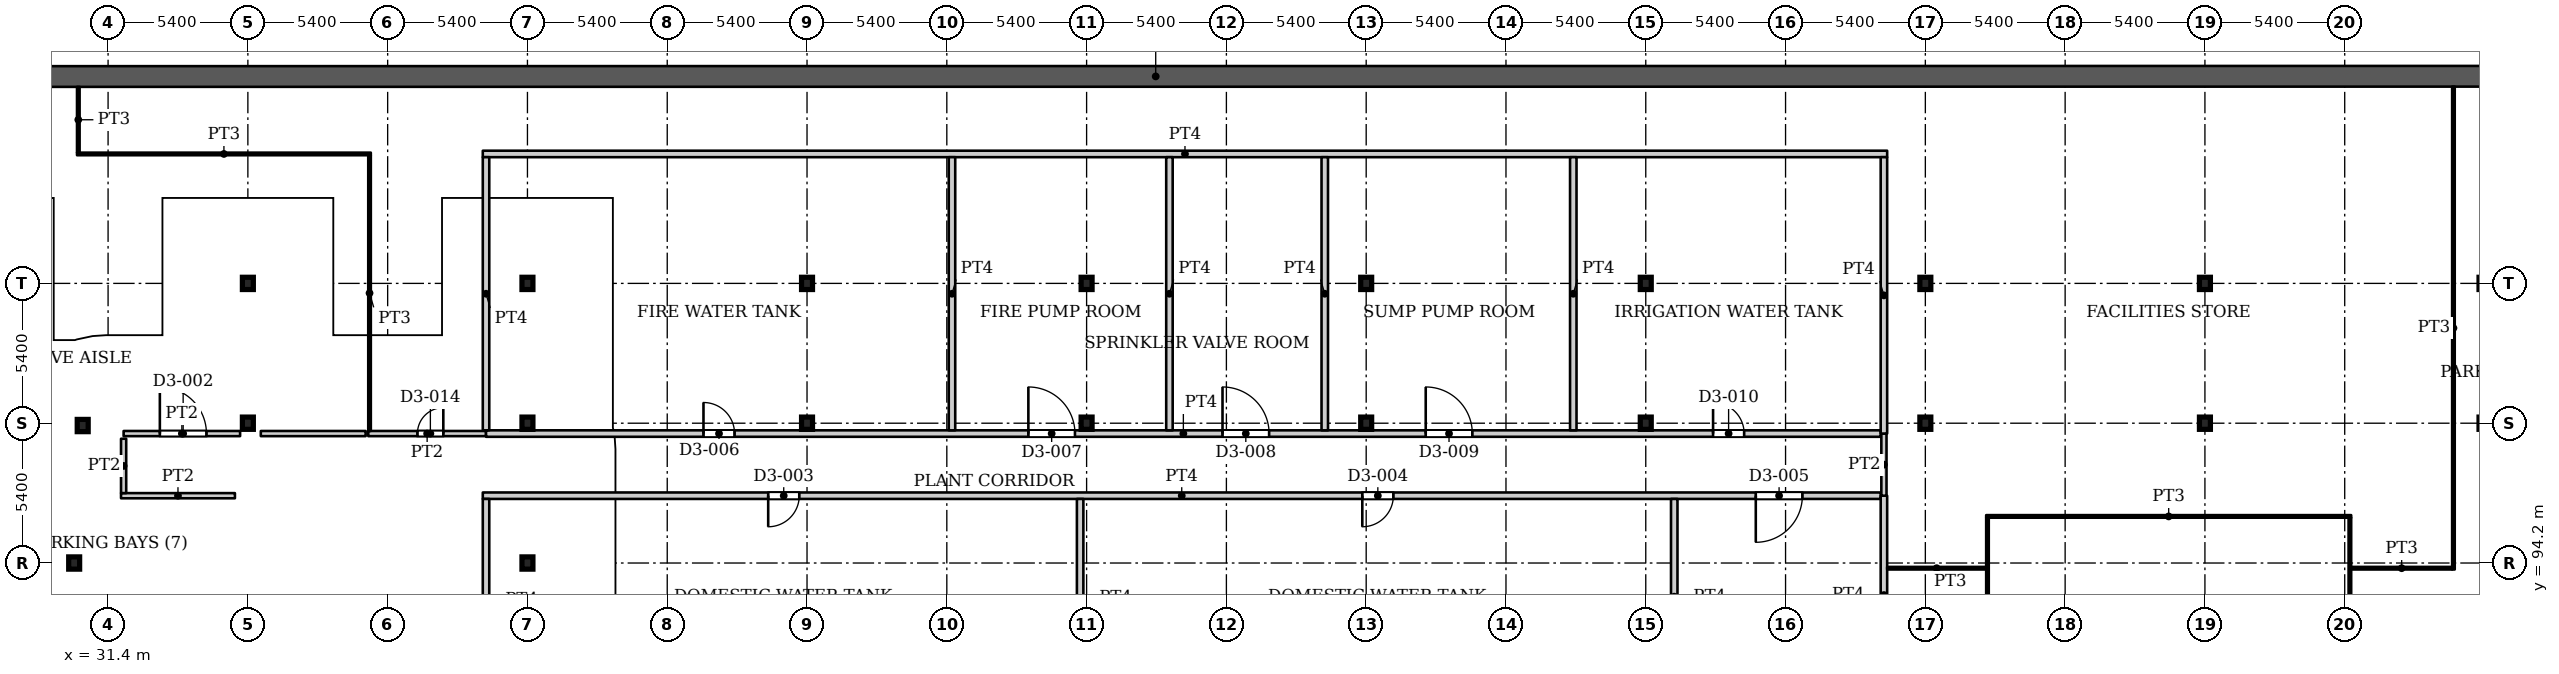
"""IFC4 building model, lengths in metres.
Left out: names, types, materials, properties, quantities, classifications, styles, units other than length and angle.
Written with IfcOpenShell. Run it as: python <this file> out.ifc"""

import sys

from ifc_helpers import new_model, si_unit, direction, frame, frame_2d, origin, origin_2d, place, context, subcontext, project, spatial, rectangle, i_section, extrude, source, transform, mapped, element, fill, save


model = new_model("IFC4")
c1 = context("Model", 3, precision=1e-05, world=origin(), true_north=direction((0.0, 1.0)))
c2 = subcontext(c1, "Body", "Model", "MODEL_VIEW")
j1 = project(units=[si_unit("LENGTHUNIT", "METRE"), si_unit("PLANEANGLEUNIT", "RADIAN")], contexts=[c1])
p1 = place(None, origin())
s1 = spatial("IfcSite", under=j1, at=p1, CompositionType="ELEMENT")
p2 = place(p1, origin())
s2 = spatial("IfcBuilding", under=s1, at=p2, CompositionType="ELEMENT")
p3 = place(p2, frame((0.0, 0.0, -15.0)))
s3 = spatial("IfcBuildingStorey", under=s2, at=p3, CompositionType="ELEMENT", Elevation=-15.0)
for number, where, z_axis, x_axis in (
    (1, (36.8, 99.6, 0.0), (0.0, 0.0, 1.0), (1.0, 0.0, 0.0)),
    (2, (47.6, 99.6, 0.0), (0.0, 0.0, 1.0), (1.0, 0.0, 0.0)),
    (3, (58.4, 99.6, 0.0), (0.0, 0.0, 1.0), (1.0, 0.0, 0.0)),
    (4, (69.2, 99.6, 0.0), (0.0, 0.0, 1.0), (1.0, 0.0, 0.0)),
    (5, (80.0, 99.6, 0.0), (0.0, 0.0, 1.0), (1.0, 0.0, 0.0)),
    (6, (90.8, 99.6, 0.0), (0.0, 0.0, 1.0), (1.0, 0.0, 0.0)),
    (7, (101.6, 99.6, 0.0), (0.0, 0.0, 1.0), (1.0, 0.0, 0.0)),
    (8, (112.4, 99.6, 0.0), (0.0, 0.0, 1.0), (1.0, 0.0, 0.0)),
    (9, (123.2, 99.6, 0.0), (0.0, 0.0, 1.0), (1.0, 0.0, 0.0)),
    (10, (36.8, 105.0, 0.0), (0.0, 0.0, 1.0), (1.0, 0.0, 0.0)),
    (11, (47.6, 105.0, 0.0), (0.0, 0.0, 1.0), (1.0, 0.0, 0.0)),
    (12, (58.4, 105.0, 0.0), (0.0, 0.0, 1.0), (1.0, 0.0, 0.0)),
    (13, (69.2, 105.0, 0.0), (0.0, 0.0, 1.0), (1.0, 0.0, 0.0)),
    (14, (80.0, 105.0, 0.0), (0.0, 0.0, 1.0), (1.0, 0.0, 0.0)),
    (15, (90.8, 105.0, 0.0), (0.0, 0.0, 1.0), (1.0, 0.0, 0.0)),
    (16, (101.6, 105.0, 0.0), (0.0, 0.0, 1.0), (1.0, 0.0, 0.0)),
    (17, (112.4, 105.0, 0.0), (0.0, 0.0, 1.0), (1.0, 0.0, 0.0)),
    (18, (123.2, 105.0, 0.0), (0.0, 0.0, 1.0), (1.0, 0.0, 0.0)),
    (19, (30.09, 94.2, 0.0), (0.0, 0.0, 1.0), (1.0, 0.0, 0.0)),
    (20, (47.6, 94.2, 0.0), (0.0, 0.0, 1.0), (1.0, 0.0, 0.0)),
    (21, (30.42, 99.51, 0.0), (0.0, 0.0, 1.0), (1.0, 0.0, 0.0)),
):
    element("IfcColumn", number, at=place(p3, frame(where, z_axis=z_axis, x_axis=x_axis)), inside=s3, PredefinedType="COLUMN", context=c2, shape_type="SweptSolid", body=[
        extrude(i_section(OverallWidth=0.424, OverallDepth=0.474, WebThickness=0.048, FlangeThickness=0.077, FilletRadius=0.014, at=origin_2d()), origin(), (0.0, 0.0, 1.0), 5.0),
    ])
p4 = place(p3, frame((17.739, 112.989, 0.0), z_axis=(0.0, 0.0, 1.0), x_axis=(0.999999994851, 0.000101480029, 0.0)))
e22 = element("IfcWall", 22, at=p4, inside=s3, PredefinedType="SOLIDWALL", context=c2, shape_type="SweptSolid", body=[
    extrude(rectangle(XDim=108.261, YDim=0.8, at=frame_2d((54.13, 0.0))), origin(), (0.0, 0.0, 1.0), 5.0),
])
p5 = place(p3, frame((30.2, 110.0, 0.0), z_axis=(0.0, 0.0, 1.0), x_axis=(1.0, 0.0, 0.0)))
e23 = element("IfcWall", 23, at=p5, inside=s3, PredefinedType="PARTITIONING", context=c2, shape_type="SweptSolid", body=[
    extrude(rectangle(XDim=11.35, YDim=0.1, at=frame_2d((5.675, 0.0))), origin(), (0.0, 0.0, 1.0), 4.68),
])
p6 = place(p3, frame((30.25, 110.05, 0.0), z_axis=(0.0, 0.0, 1.0), x_axis=(0.0, 1.0, 0.0)))
e24 = element("IfcWall", 24, at=p6, inside=s3, PredefinedType="PARTITIONING", context=c2, shape_type="SweptSolid", body=[
    extrude(rectangle(XDim=2.541, YDim=0.1, at=frame_2d((1.271, 0.0))), origin(), (0.0, 0.0, 1.0), 4.68),
])
p7 = place(p3, frame((31.9, 96.8, 0.0), z_axis=(0.0, 0.0, 1.0), x_axis=(1.0, 0.0, 0.0)))
e25 = element("IfcWall", 25, at=p7, inside=s3, PredefinedType="PARTITIONING", context=c2, shape_type="SweptSolid", body=[
    extrude(rectangle(XDim=4.4, YDim=0.2, at=frame_2d((2.2, 0.0))), origin(), (0.0, 0.0, 1.0), 4.68),
])
p8 = place(p3, frame((32.0, 96.9, 0.0), z_axis=(0.0, 0.0, 1.0), x_axis=(0.0, 1.0, 0.0)))
e26 = element("IfcWall", 26, at=p8, inside=s3, PredefinedType="PARTITIONING", context=c2, shape_type="SweptSolid", body=[
    extrude(rectangle(XDim=2.1, YDim=0.2, at=frame_2d((1.05, 0.0))), origin(), (0.0, 0.0, 1.0), 4.68),
])
p9 = place(p3, frame((32.0, 99.2, 0.0), z_axis=(0.0, 0.0, 1.0), x_axis=(1.0, 0.0, 0.0)))
e27 = element("IfcWall", 27, at=p9, inside=s3, PredefinedType="PARTITIONING", context=c2, shape_type="SweptSolid", body=[
    extrude(rectangle(XDim=4.5, YDim=0.2, at=frame_2d((2.25, 0.0))), origin(), (0.0, 0.0, 1.0), 4.68),
])
p10 = place(p9, frame((1.4, 0.0, 0.0)))
e28 = element("IfcOpeningElement", 28, at=p10, cuts=e27, PredefinedType="OPENING", context=c2, shape_type="SweptSolid", body=[
    extrude(rectangle(XDim=1.8, YDim=2.1, at=frame_2d((0.9, 1.05))), frame((0.0, 0.11, 0.0), z_axis=(0.0, -1.0, 0.0), x_axis=(1.0, 0.0, 0.0)), (0.0, 0.0, 1.0), 0.22),
])
p11 = place(p3, frame((37.3, 99.2, 0.0), z_axis=(0.0, 0.0, 1.0), x_axis=(1.0, 0.0, 0.0)))
e29 = element("IfcWall", 29, at=p11, inside=s3, PredefinedType="PARTITIONING", context=c2, shape_type="SweptSolid", body=[
    extrude(rectangle(XDim=4.05, YDim=0.2, at=frame_2d((2.025, 0.0))), origin(), (0.0, 0.0, 1.0), 4.68),
])
p12 = place(p3, frame((41.45, 99.2, 0.0), z_axis=(0.0, 0.0, 1.0), x_axis=(1.0, 0.0, 0.0)))
e30 = element("IfcWall", 30, at=p12, inside=s3, PredefinedType="PARTITIONING", context=c2, shape_type="SweptSolid", body=[
    extrude(rectangle(XDim=4.55, YDim=0.2, at=frame_2d((2.275, 0.0))), origin(), (0.0, 0.0, 1.0), 4.68),
])
p13 = place(p12, frame((1.9, 0.0, 0.0)))
e31 = element("IfcOpeningElement", 31, at=p13, cuts=e30, PredefinedType="OPENING", context=c2, shape_type="SweptSolid", body=[
    extrude(rectangle(XDim=1.0, YDim=2.1, at=frame_2d((0.5, 1.05))), frame((0.0, 0.11, 0.0), z_axis=(0.0, -1.0, 0.0), x_axis=(1.0, 0.0, 0.0)), (0.0, 0.0, 1.0), 0.22),
])
p14 = place(p3, frame((41.5, 99.3, 0.0), z_axis=(0.0, 0.0, 1.0), x_axis=(0.0, 1.0, 0.0)))
e32 = element("IfcWall", 32, at=p14, inside=s3, PredefinedType="PARTITIONING", context=c2, shape_type="SweptSolid", body=[
    extrude(rectangle(XDim=10.65, YDim=0.1, at=frame_2d((5.325, 0.0))), origin(), (0.0, 0.0, 1.0), 4.68),
])
p15 = place(p3, frame((45.875, 96.8, 0.0), z_axis=(0.0, 0.0, 1.0), x_axis=(1.0, 0.0, 0.0)))
e33 = element("IfcWall", 33, at=p15, inside=s3, PredefinedType="PARTITIONING", context=c2, shape_type="SweptSolid", body=[
    extrude(rectangle(XDim=54.0, YDim=0.25, at=frame_2d((27.0, 0.0))), origin(), (0.0, 0.0, 1.0), 4.68),
])
p16 = place(p15, frame((11.025, 0.0, 0.0)))
e34 = element("IfcOpeningElement", 34, at=p16, cuts=e33, PredefinedType="OPENING", context=c2, shape_type="SweptSolid", body=[
    extrude(rectangle(XDim=1.2, YDim=2.1, at=frame_2d((0.6, 1.05))), frame((0.0, 0.135, 0.0), z_axis=(0.0, -1.0, 0.0), x_axis=(1.0, 0.0, 0.0)), (0.0, 0.0, 1.0), 0.27),
])
p17 = place(p15, frame((33.975, 0.0, 0.0)))
e35 = element("IfcOpeningElement", 35, at=p17, cuts=e33, PredefinedType="OPENING", context=c2, shape_type="SweptSolid", body=[
    extrude(rectangle(XDim=1.2, YDim=2.1, at=frame_2d((0.6, 1.05))), frame((0.0, 0.135, 0.0), z_axis=(0.0, -1.0, 0.0), x_axis=(1.0, 0.0, 0.0)), (0.0, 0.0, 1.0), 0.27),
])
p18 = place(p15, frame((49.175, 0.0, 0.0)))
e36 = element("IfcOpeningElement", 36, at=p18, cuts=e33, PredefinedType="OPENING", context=c2, shape_type="SweptSolid", body=[
    extrude(rectangle(XDim=1.8, YDim=2.1, at=frame_2d((0.9, 1.05))), frame((0.0, 0.135, 0.0), z_axis=(0.0, -1.0, 0.0), x_axis=(1.0, 0.0, 0.0)), (0.0, 0.0, 1.0), 0.27),
])
p19 = place(p3, frame((45.875, 110.0, 0.0), z_axis=(0.0, 0.0, 1.0), x_axis=(1.0, 0.0, 0.0)))
e37 = element("IfcWall", 37, at=p19, inside=s3, PredefinedType="PARTITIONING", context=c2, shape_type="SweptSolid", body=[
    extrude(rectangle(XDim=54.25, YDim=0.25, at=frame_2d((27.125, 0.0))), origin(), (0.0, 0.0, 1.0), 4.68),
])
p20 = place(p3, frame((46.0, 88.875, 0.0), z_axis=(0.0, 0.0, 1.0), x_axis=(0.0, 1.0, 0.0)))
e38 = element("IfcWall", 38, at=p20, inside=s3, PredefinedType="PARTITIONING", context=c2, shape_type="SweptSolid", body=[
    extrude(rectangle(XDim=7.8, YDim=0.25, at=frame_2d((3.9, 0.0))), origin(), (0.0, 0.0, 1.0), 4.68),
])
p21 = place(p3, frame((46.0, 99.2, 0.0), z_axis=(0.0, 0.0, 1.0), x_axis=(1.0, 0.0, 0.0)))
e39 = element("IfcWall", 39, at=p21, inside=s3, PredefinedType="PARTITIONING", context=c2, shape_type="SweptSolid", body=[
    extrude(rectangle(XDim=53.875, YDim=0.25, at=frame_2d((26.938, 0.0))), origin(), (0.0, 0.0, 1.0), 4.68),
])
p22 = place(p21, frame((8.4, 0.0, 0.0)))
e40 = element("IfcOpeningElement", 40, at=p22, cuts=e39, PredefinedType="OPENING", context=c2, shape_type="SweptSolid", body=[
    extrude(rectangle(XDim=1.2, YDim=2.1, at=frame_2d((0.6, 1.05))), frame((0.0, 0.135, 0.0), z_axis=(0.0, -1.0, 0.0), x_axis=(1.0, 0.0, 0.0)), (0.0, 0.0, 1.0), 0.27),
])
p23 = place(p21, frame((20.95, 0.0, 0.0)))
e41 = element("IfcOpeningElement", 41, at=p23, cuts=e39, PredefinedType="OPENING", context=c2, shape_type="SweptSolid", body=[
    extrude(rectangle(XDim=1.8, YDim=2.1, at=frame_2d((0.9, 1.05))), frame((0.0, 0.135, 0.0), z_axis=(0.0, -1.0, 0.0), x_axis=(1.0, 0.0, 0.0)), (0.0, 0.0, 1.0), 0.27),
])
p24 = place(p21, frame((28.45, 0.0, 0.0)))
e42 = element("IfcOpeningElement", 42, at=p24, cuts=e39, PredefinedType="OPENING", context=c2, shape_type="SweptSolid", body=[
    extrude(rectangle(XDim=1.8, YDim=2.1, at=frame_2d((0.9, 1.05))), frame((0.0, 0.135, 0.0), z_axis=(0.0, -1.0, 0.0), x_axis=(1.0, 0.0, 0.0)), (0.0, 0.0, 1.0), 0.27),
])
p25 = place(p21, frame((36.3, 0.0, 0.0)))
e43 = element("IfcOpeningElement", 43, at=p25, cuts=e39, PredefinedType="OPENING", context=c2, shape_type="SweptSolid", body=[
    extrude(rectangle(XDim=1.8, YDim=2.1, at=frame_2d((0.9, 1.05))), frame((0.0, 0.135, 0.0), z_axis=(0.0, -1.0, 0.0), x_axis=(1.0, 0.0, 0.0)), (0.0, 0.0, 1.0), 0.27),
])
p26 = place(p21, frame((47.4, 0.0, 0.0)))
e44 = element("IfcOpeningElement", 44, at=p26, cuts=e39, PredefinedType="OPENING", context=c2, shape_type="SweptSolid", body=[
    extrude(rectangle(XDim=1.2, YDim=2.1, at=frame_2d((0.6, 1.05))), frame((0.0, 0.135, 0.0), z_axis=(0.0, -1.0, 0.0), x_axis=(1.0, 0.0, 0.0)), (0.0, 0.0, 1.0), 0.27),
])
for number, where, z_axis, x_axis in (
    (45, (46.0, 99.325, 0.0), (0.0, 0.0, 1.0), (0.0, 1.0, 0.0)),
    (46, (64.0, 99.325, 0.0), (0.0, 0.0, 1.0), (0.0, 1.0, 0.0)),
):
    element("IfcWall", number, at=place(p3, frame(where, z_axis=z_axis, x_axis=x_axis)), inside=s3, PredefinedType="PARTITIONING", context=c2, shape_type="SweptSolid", body=[
        extrude(rectangle(XDim=10.55, YDim=0.25, at=frame_2d((5.275, 0.0))), origin(), (0.0, 0.0, 1.0), 4.68),
    ])
p27 = place(p3, frame((68.95, 89.036, 0.0), z_axis=(0.0, 0.0, 1.0), x_axis=(0.0, 1.0, 0.0)))
e47 = element("IfcWall", 47, at=p27, inside=s3, PredefinedType="PARTITIONING", context=c2, shape_type="SweptSolid", body=[
    extrude(rectangle(XDim=7.639, YDim=0.25, at=frame_2d((3.82, 0.0))), origin(), (0.0, 0.0, 1.0), 4.68),
])
for number, where, z_axis, x_axis in (
    (48, (72.4, 99.325, 0.0), (0.0, 0.0, 1.0), (0.0, 1.0, 0.0)),
    (49, (78.4, 99.325, 0.0), (0.0, 0.0, 1.0), (0.0, 1.0, 0.0)),
    (50, (88.0, 99.325, 0.0), (0.0, 0.0, 1.0), (0.0, 1.0, 0.0)),
):
    element("IfcWall", number, at=place(p3, frame(where, z_axis=z_axis, x_axis=x_axis)), inside=s3, PredefinedType="PARTITIONING", context=c2, shape_type="SweptSolid", body=[
        extrude(rectangle(XDim=10.55, YDim=0.25, at=frame_2d((5.275, 0.0))), origin(), (0.0, 0.0, 1.0), 4.68),
    ])
p28 = place(p3, frame((91.9, 89.125, 0.0), z_axis=(0.0, 0.0, 1.0), x_axis=(0.0, 1.0, 0.0)))
e51 = element("IfcWall", 51, at=p28, inside=s3, PredefinedType="PARTITIONING", context=c2, shape_type="SweptSolid", body=[
    extrude(rectangle(XDim=7.55, YDim=0.25, at=frame_2d((3.775, 0.0))), origin(), (0.0, 0.0, 1.0), 4.68),
])
p29 = place(p3, frame((100.0, 89.125, 0.0), z_axis=(0.0, 0.0, 1.0), x_axis=(0.0, 1.0, 0.0)))
e52 = element("IfcWall", 52, at=p29, inside=s3, PredefinedType="PARTITIONING", context=c2, shape_type="SweptSolid", body=[
    extrude(rectangle(XDim=7.675, YDim=0.25, at=frame_2d((3.837, 0.0))), origin(), (0.0, 0.0, 1.0), 4.68),
])
p30 = place(p3, frame((100.0, 96.8, 0.0), z_axis=(0.0, 0.0, 1.0), x_axis=(0.0, 1.0, 0.0)))
e53 = element("IfcWall", 53, at=p30, inside=s3, PredefinedType="PARTITIONING", context=c2, shape_type="SweptSolid", body=[
    extrude(rectangle(XDim=2.4, YDim=0.2, at=frame_2d((1.2, 0.0))), origin(), (0.0, 0.0, 1.0), 4.68),
])
p31 = place(p3, frame((100.0, 99.2, 0.0), z_axis=(0.0, 0.0, 1.0), x_axis=(0.0, 1.0, 0.0)))
e54 = element("IfcWall", 54, at=p31, inside=s3, PredefinedType="PARTITIONING", context=c2, shape_type="SweptSolid", body=[
    extrude(rectangle(XDim=10.675, YDim=0.25, at=frame_2d((5.337, 0.0))), origin(), (0.0, 0.0, 1.0), 4.68),
])
p32 = place(p3, frame((100.125, 94.0, 0.0), z_axis=(0.0, 0.0, 1.0), x_axis=(1.0, 0.0, 0.0)))
e55 = element("IfcWall", 55, at=p32, inside=s3, PredefinedType="PARTITIONING", context=c2, shape_type="SweptSolid", body=[
    extrude(rectangle(XDim=3.825, YDim=0.1, at=frame_2d((1.913, 0.0))), origin(), (0.0, 0.0, 1.0), 4.68),
])
p33 = place(p3, frame((103.95, 96.0, 0.0), z_axis=(0.0, 0.0, 1.0), x_axis=(1.0, 0.0, 0.0)))
e56 = element("IfcWall", 56, at=p33, inside=s3, PredefinedType="PARTITIONING", context=c2, shape_type="SweptSolid", body=[
    extrude(rectangle(XDim=14.1, YDim=0.1, at=frame_2d((7.05, 0.0))), origin(), (0.0, 0.0, 1.0), 4.68),
])
p34 = place(p3, frame((104.0, 89.05, 0.0), z_axis=(0.0, 0.0, 1.0), x_axis=(0.0, 1.0, 0.0)))
e57 = element("IfcWall", 57, at=p34, inside=s3, PredefinedType="PARTITIONING", context=c2, shape_type="SweptSolid", body=[
    extrude(rectangle(XDim=6.9, YDim=0.1, at=frame_2d((3.45, 0.0))), origin(), (0.0, 0.0, 1.0), 4.68),
])
p35 = place(p3, frame((118.0, 88.95, 0.0), z_axis=(0.0, 0.0, 1.0), x_axis=(0.0, 1.0, 0.0)))
e58 = element("IfcWall", 58, at=p35, inside=s3, PredefinedType="PARTITIONING", context=c2, shape_type="SweptSolid", body=[
    extrude(rectangle(XDim=7.0, YDim=0.1, at=frame_2d((3.5, 0.0))), origin(), (0.0, 0.0, 1.0), 4.68),
])
p36 = place(p3, frame((118.05, 94.0, 0.0), z_axis=(0.0, 0.0, 1.0), x_axis=(1.0, 0.0, 0.0)))
e59 = element("IfcWall", 59, at=p36, inside=s3, PredefinedType="PARTITIONING", context=c2, shape_type="SweptSolid", body=[
    extrude(rectangle(XDim=3.9, YDim=0.1, at=frame_2d((1.95, 0.0))), origin(), (0.0, 0.0, 1.0), 4.68),
])
p37 = place(p3, frame((122.0, 93.95, 0.0), z_axis=(0.0, 0.0, 1.0), x_axis=(0.0, 1.0, 0.0)))
e60 = element("IfcWall", 60, at=p37, inside=s3, PredefinedType="PARTITIONING", context=c2, shape_type="SweptSolid", body=[
    extrude(rectangle(XDim=18.651, YDim=0.1, at=frame_2d((9.326, 0.0))), origin(), (0.0, 0.0, 1.0), 4.68),
])
m1 = source(origin(), c2, "Body", "SweptSolid", [
    extrude(rectangle(XDim=1.8, YDim=2.1, at=frame_2d((0.9, 1.05))), frame((0.0, 0.025, 0.0), z_axis=(0.0, -1.0, 0.0), x_axis=(1.0, 0.0, 0.0)), (0.0, 0.0, 1.0), 0.05),
])
p38 = place(p10, origin())
e61 = element("IfcDoor", 61, at=p38, inside=s3, OperationType="DOUBLE_DOOR_SINGLE_SWING", PredefinedType="DOOR", context=c2, shape_type="MappedRepresentation", body=[
    mapped(m1, transform((0.0, 0.0, 0.0), x_axis=(1.0, 0.0, 0.0), y_axis=(0.0, 1.0, 0.0), z_axis=(0.0, 0.0, 1.0), scale=1.0)),
])
fill(e28, e61)
m2 = source(origin(), c2, "Body", "SweptSolid", [
    extrude(rectangle(XDim=1.2, YDim=2.1, at=frame_2d((0.6, 1.05))), frame((0.0, 0.025, 0.0), z_axis=(0.0, -1.0, 0.0), x_axis=(1.0, 0.0, 0.0)), (0.0, 0.0, 1.0), 0.05),
])
p39 = place(p16, origin())
e62 = element("IfcDoor", 62, at=p39, inside=s3, OperationType="SINGLE_SWING_RIGHT", PredefinedType="DOOR", context=c2, shape_type="MappedRepresentation", body=[
    mapped(m2, transform((0.0, 0.0, 0.0), x_axis=(1.0, 0.0, 0.0), y_axis=(0.0, 1.0, 0.0), z_axis=(0.0, 0.0, 1.0), scale=1.0)),
])
fill(e34, e62)
p40 = place(p17, origin())
e63 = element("IfcDoor", 63, at=p40, inside=s3, OperationType="SINGLE_SWING_RIGHT", PredefinedType="DOOR", context=c2, shape_type="MappedRepresentation", body=[
    mapped(m2, transform((0.0, 0.0, 0.0), x_axis=(1.0, 0.0, 0.0), y_axis=(0.0, 1.0, 0.0), z_axis=(0.0, 0.0, 1.0), scale=1.0)),
])
fill(e35, e63)
m3 = source(origin(), c2, "Body", "SweptSolid", [
    extrude(rectangle(XDim=1.8, YDim=2.1, at=frame_2d((0.9, 1.05))), frame((0.0, 0.025, 0.0), z_axis=(0.0, -1.0, 0.0), x_axis=(1.0, 0.0, 0.0)), (0.0, 0.0, 1.0), 0.05),
])
p41 = place(p18, origin())
e64 = element("IfcDoor", 64, at=p41, inside=s3, OperationType="DOUBLE_DOOR_SINGLE_SWING", PredefinedType="DOOR", context=c2, shape_type="MappedRepresentation", body=[
    mapped(m3, transform((0.0, 0.0, 0.0), x_axis=(1.0, 0.0, 0.0), y_axis=(0.0, 1.0, 0.0), z_axis=(0.0, 0.0, 1.0), scale=1.0)),
])
fill(e36, e64)
p42 = place(p22, origin())
e65 = element("IfcDoor", 65, at=p42, inside=s3, OperationType="SINGLE_SWING_LEFT", PredefinedType="DOOR", context=c2, shape_type="MappedRepresentation", body=[
    mapped(m2, transform((0.0, 0.0, 0.0), x_axis=(1.0, 0.0, 0.0), y_axis=(0.0, 1.0, 0.0), z_axis=(0.0, 0.0, 1.0), scale=1.0)),
])
fill(e40, e65)
p43 = place(p23, origin())
e66 = element("IfcDoor", 66, at=p43, inside=s3, OperationType="DOUBLE_DOOR_SINGLE_SWING", PredefinedType="DOOR", context=c2, shape_type="MappedRepresentation", body=[
    mapped(m3, transform((0.0, 0.0, 0.0), x_axis=(1.0, 0.0, 0.0), y_axis=(0.0, 1.0, 0.0), z_axis=(0.0, 0.0, 1.0), scale=1.0)),
])
fill(e41, e66)
p44 = place(p24, origin())
e67 = element("IfcDoor", 67, at=p44, inside=s3, OperationType="DOUBLE_DOOR_SINGLE_SWING", PredefinedType="DOOR", context=c2, shape_type="MappedRepresentation", body=[
    mapped(m3, transform((0.0, 0.0, 0.0), x_axis=(1.0, 0.0, 0.0), y_axis=(0.0, 1.0, 0.0), z_axis=(0.0, 0.0, 1.0), scale=1.0)),
])
fill(e42, e67)
p45 = place(p25, origin())
e68 = element("IfcDoor", 68, at=p45, inside=s3, OperationType="DOUBLE_DOOR_SINGLE_SWING", PredefinedType="DOOR", context=c2, shape_type="MappedRepresentation", body=[
    mapped(m3, transform((0.0, 0.0, 0.0), x_axis=(1.0, 0.0, 0.0), y_axis=(0.0, 1.0, 0.0), z_axis=(0.0, 0.0, 1.0), scale=1.0)),
])
fill(e43, e68)
p46 = place(p26, origin())
e69 = element("IfcDoor", 69, at=p46, inside=s3, OperationType="SINGLE_SWING_LEFT", PredefinedType="DOOR", context=c2, shape_type="MappedRepresentation", body=[
    mapped(m2, transform((0.0, 0.0, 0.0), x_axis=(1.0, 0.0, 0.0), y_axis=(0.0, 1.0, 0.0), z_axis=(0.0, 0.0, 1.0), scale=1.0)),
])
fill(e44, e69)
m4 = source(origin(), c2, "Body", "SweptSolid", [
    extrude(rectangle(XDim=1.0, YDim=2.1, at=frame_2d((0.5, 1.05))), frame((0.0, 0.025, 0.0), z_axis=(0.0, -1.0, 0.0), x_axis=(1.0, 0.0, 0.0)), (0.0, 0.0, 1.0), 0.05),
])
p47 = place(p13, origin())
e70 = element("IfcDoor", 70, at=p47, inside=s3, OperationType="SINGLE_SWING_LEFT", PredefinedType="DOOR", context=c2, shape_type="MappedRepresentation", body=[
    mapped(m4, transform((0.0, 0.0, 0.0), x_axis=(1.0, 0.0, 0.0), y_axis=(0.0, 1.0, 0.0), z_axis=(0.0, 0.0, 1.0), scale=1.0)),
])
fill(e31, e70)
save(model, sys.argv[1])
